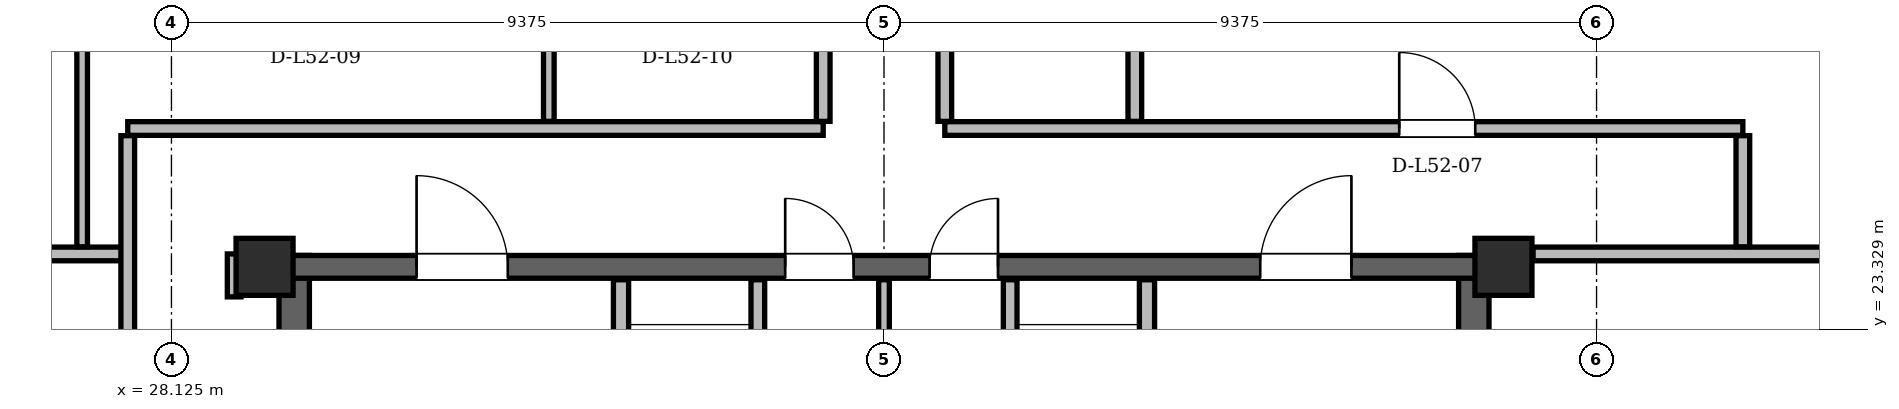
"""IFC4 building model, lengths in metres.
Left out: names, types, materials, properties, quantities, classifications, styles, units other than length and angle.
Written with IfcOpenShell. Run it as: python <this file> out.ifc"""

import sys

from ifc_helpers import new_model, si_unit, direction, frame, frame_2d, origin, origin_2d, place, context, subcontext, project, spatial, rectangle, hollow_rectangle, extrude, element, fill, save


model = new_model("IFC4")
c1 = context("Model", 3, precision=1e-05, world=origin(), true_north=direction((0.0, 1.0)))
c2 = subcontext(c1, "Body", "Model", "MODEL_VIEW")
j1 = project(units=[si_unit("LENGTHUNIT", "METRE"), si_unit("PLANEANGLEUNIT", "RADIAN")], contexts=[c1])
p1 = place(None, origin())
s1 = spatial("IfcSite", under=j1, at=p1, CompositionType="ELEMENT")
p2 = place(p1, origin())
s2 = spatial("IfcBuilding", under=s1, at=p2, CompositionType="ELEMENT")
p3 = place(p2, frame((0.0, 0.0, 197.4)))
s3 = spatial("IfcBuildingStorey", under=s2, at=p3, CompositionType="ELEMENT", Elevation=197.4)
for number, where, z_axis, x_axis in (
    (1, (45.65, 24.15, 0.0), (0.0, 0.0, 1.0), (1.0, 0.0, 0.0)),
    (2, (29.35, 24.15, 0.0), (0.0, 0.0, 1.0), (1.0, 0.0, 0.0)),
):
    element("IfcColumn", number, at=place(p3, frame(where, z_axis=z_axis, x_axis=x_axis)), inside=s3, PredefinedType="COLUMN", context=c2, shape_type="SweptSolid", body=[
        extrude(hollow_rectangle(XDim=0.75, YDim=0.75, WallThickness=0.06, at=origin_2d()), origin(), (0.0, 0.0, 1.0), 3.6),
    ])
for number, where, z_axis, x_axis in (
    (3, (29.74, 11.0, 0.0), (0.0, 0.0, 1.0), (0.0, 1.0, 0.0)),
    (4, (45.26, 11.0, 0.0), (0.0, 0.0, 1.0), (0.0, 1.0, 0.0)),
):
    element("IfcWall", number, at=place(p3, frame(where, z_axis=z_axis, x_axis=x_axis)), inside=s3, PredefinedType="SHEAR", context=c2, shape_type="SweptSolid", body=[
        extrude(rectangle(XDim=13.3, YDim=0.4, at=frame_2d((6.65, 0.0))), origin(), (0.0, 0.0, 1.0), 3.38),
    ])
p4 = place(p3, frame((29.65, 24.15, 0.0), z_axis=(0.0, 0.0, 1.0), x_axis=(1.0, 0.0, 0.0)))
e5 = element("IfcWall", 5, at=p4, inside=s3, PredefinedType="SHEAR", context=c2, shape_type="SweptSolid", body=[
    extrude(rectangle(XDim=15.7, YDim=0.3, at=frame_2d((7.85, 0.0))), origin(), (0.0, 0.0, 1.0), 3.38),
])
p5 = place(p4, frame((1.7, 0.0, 0.0)))
e6 = element("IfcOpeningElement", 6, at=p5, cuts=e5, PredefinedType="OPENING", context=c2, shape_type="SweptSolid", body=[
    extrude(rectangle(XDim=1.2, YDim=2.2, at=frame_2d((0.6, 1.1))), frame((0.0, 0.15, 0.0), z_axis=(0.0, -1.0, 0.0), x_axis=(1.0, 0.0, 0.0)), (0.0, 0.0, 1.0), 0.3),
])
p6 = place(p4, frame((12.8, 0.0, 0.0)))
e7 = element("IfcOpeningElement", 7, at=p6, cuts=e5, PredefinedType="OPENING", context=c2, shape_type="SweptSolid", body=[
    extrude(rectangle(XDim=1.2, YDim=2.2, at=frame_2d((0.6, 1.1))), frame((0.0, 0.15, 0.0), z_axis=(0.0, -1.0, 0.0), x_axis=(1.0, 0.0, 0.0)), (0.0, 0.0, 1.0), 0.3),
])
p7 = place(p4, frame((6.55, 0.0, 0.0)))
e8 = element("IfcOpeningElement", 8, at=p7, cuts=e5, PredefinedType="OPENING", context=c2, shape_type="SweptSolid", body=[
    extrude(rectangle(XDim=0.9, YDim=2.05, at=frame_2d((0.45, 1.025))), frame((0.0, 0.15, 0.0), z_axis=(0.0, -1.0, 0.0), x_axis=(1.0, 0.0, 0.0)), (0.0, 0.0, 1.0), 0.3),
])
p8 = place(p4, frame((8.45, 0.0, 0.0)))
e9 = element("IfcOpeningElement", 9, at=p8, cuts=e5, PredefinedType="OPENING", context=c2, shape_type="SweptSolid", body=[
    extrude(rectangle(XDim=0.9, YDim=2.05, at=frame_2d((0.45, 1.025))), frame((0.0, 0.15, 0.0), z_axis=(0.0, -1.0, 0.0), x_axis=(1.0, 0.0, 0.0)), (0.0, 0.0, 1.0), 0.3),
])
p9 = place(p3, frame((33.766, 43.21, 0.0), z_axis=(0.0, 0.0, 1.0), x_axis=(-0.499998847915, -0.86602606894, 0.0)))
e10 = element("IfcWall", 10, at=p9, inside=s3, PredefinedType="SOLIDWALL", context=c2, shape_type="SweptSolid", body=[
    extrude(rectangle(XDim=36.293, YDim=0.29, at=frame_2d((18.147, 0.0))), origin(), (0.0, 0.0, 1.0), 2.677),
])
p10 = place(p9, frame((8.034, 0.0, 0.0)))
e11 = element("IfcOpeningElement", 11, at=p10, cuts=e10, PredefinedType="OPENING", context=c2, shape_type="SweptSolid", body=[
    extrude(rectangle(XDim=1.5, YDim=2.2, at=frame_2d((0.75, 1.1))), frame((0.0, 0.145, 0.0), z_axis=(0.0, -1.0, 0.0), x_axis=(1.0, 0.0, 0.0)), (0.0, 0.0, 1.0), 0.29),
])
p11 = place(p9, frame((28.214, 0.0, 0.0)))
e12 = element("IfcOpeningElement", 12, at=p11, cuts=e10, PredefinedType="OPENING", context=c2, shape_type="SweptSolid", body=[
    extrude(rectangle(XDim=1.5, YDim=2.2, at=frame_2d((0.75, 1.1))), frame((0.0, 0.145, 0.0), z_axis=(0.0, -1.0, 0.0), x_axis=(1.0, 0.0, 0.0)), (0.0, 0.0, 1.0), 0.29),
])
p12 = place(p9, frame((32.772, 0.0, 0.85)))
e13 = element("IfcOpeningElement", 13, at=p12, cuts=e10, PredefinedType="OPENING", context=c2, shape_type="SweptSolid", body=[
    extrude(rectangle(XDim=2.4, YDim=1.717, at=frame_2d((1.2, 0.858))), frame((0.0, 0.145, 0.0), z_axis=(0.0, -1.0, 0.0), x_axis=(1.0, 0.0, 0.0)), (0.0, 0.0, 1.0), 0.29),
])
p13 = place(p9, frame((21.96, 0.0, 0.85)))
e14 = element("IfcOpeningElement", 14, at=p13, cuts=e10, PredefinedType="OPENING", context=c2, shape_type="SweptSolid", body=[
    extrude(rectangle(XDim=2.0, YDim=1.717, at=frame_2d((1.0, 0.858))), frame((0.0, 0.145, 0.0), z_axis=(0.0, -1.0, 0.0), x_axis=(1.0, 0.0, 0.0)), (0.0, 0.0, 1.0), 0.29),
])
p14 = place(p9, frame((2.382, 0.0, 0.85)))
e15 = element("IfcOpeningElement", 15, at=p14, cuts=e10, PredefinedType="OPENING", context=c2, shape_type="SweptSolid", body=[
    extrude(rectangle(XDim=1.6, YDim=1.7, at=frame_2d((0.8, 0.85))), frame((0.0, 0.145, 0.0), z_axis=(0.0, -1.0, 0.0), x_axis=(1.0, 0.0, 0.0)), (0.0, 0.0, 1.0), 0.29),
])
p15 = place(p9, frame((13.34, 0.0, 0.85)))
e16 = element("IfcOpeningElement", 16, at=p15, cuts=e10, PredefinedType="OPENING", context=c2, shape_type="SweptSolid", body=[
    extrude(rectangle(XDim=3.0, YDim=1.717, at=frame_2d((1.5, 0.858))), frame((0.0, 0.145, 0.0), z_axis=(0.0, -1.0, 0.0), x_axis=(1.0, 0.0, 0.0)), (0.0, 0.0, 1.0), 0.29),
])
p16 = place(p3, frame((34.04, 19.48, 0.0), z_axis=(0.0, 0.0, 1.0), x_axis=(0.0, 1.0, 0.0)))
e17 = element("IfcWall", 17, at=p16, inside=s3, PredefinedType="PARTITIONING", context=c2, shape_type="SweptSolid", body=[
    extrude(rectangle(XDim=4.5, YDim=0.2, at=frame_2d((2.25, 0.0))), origin(), (0.0, 0.0, 1.0), 3.38),
])
p17 = place(p16, frame((2.12, 0.0, 0.0)))
e18 = element("IfcOpeningElement", 18, at=p17, cuts=e17, PredefinedType="OPENING", context=c2, shape_type="SweptSolid", body=[
    extrude(rectangle(XDim=1.1, YDim=2.2, at=frame_2d((0.55, 1.1))), frame((0.0, 0.1, 0.0), z_axis=(0.0, -1.0, 0.0), x_axis=(1.0, 0.0, 0.0)), (0.0, 0.0, 1.0), 0.2),
])
p18 = place(p3, frame((35.84, 20.96, 0.0), z_axis=(0.0, 0.0, 1.0), x_axis=(0.0, 1.0, 0.0)))
e19 = element("IfcWall", 19, at=p18, inside=s3, PredefinedType="PARTITIONING", context=c2, shape_type="SweptSolid", body=[
    extrude(rectangle(XDim=3.02, YDim=0.18, at=frame_2d((1.51, 0.0))), origin(), (0.0, 0.0, 1.0), 3.38),
])
p19 = place(p3, frame((40.96, 19.48, 0.0), z_axis=(0.0, 0.0, 1.0), x_axis=(0.0, 1.0, 0.0)))
e20 = element("IfcWall", 20, at=p19, inside=s3, PredefinedType="PARTITIONING", context=c2, shape_type="SweptSolid", body=[
    extrude(rectangle(XDim=4.5, YDim=0.2, at=frame_2d((2.25, 0.0))), origin(), (0.0, 0.0, 1.0), 3.38),
])
p20 = place(p19, frame((2.12, 0.0, 0.0)))
e21 = element("IfcOpeningElement", 21, at=p20, cuts=e20, PredefinedType="OPENING", context=c2, shape_type="SweptSolid", body=[
    extrude(rectangle(XDim=1.1, YDim=2.2, at=frame_2d((0.55, 1.1))), frame((0.0, 0.1, 0.0), z_axis=(0.0, -1.0, 0.0), x_axis=(1.0, 0.0, 0.0)), (0.0, 0.0, 1.0), 0.2),
])
p21 = place(p3, frame((39.16, 20.96, 0.0), z_axis=(0.0, 0.0, 1.0), x_axis=(0.0, 1.0, 0.0)))
e22 = element("IfcWall", 22, at=p21, inside=s3, PredefinedType="PARTITIONING", context=c2, shape_type="SweptSolid", body=[
    extrude(rectangle(XDim=3.02, YDim=0.18, at=frame_2d((1.51, 0.0))), origin(), (0.0, 0.0, 1.0), 3.38),
])
p22 = place(p3, frame((37.5, 21.06, 0.0), z_axis=(0.0, 0.0, 1.0), x_axis=(0.0, 1.0, 0.0)))
e23 = element("IfcWall", 23, at=p22, inside=s3, PredefinedType="PARTITIONING", context=c2, shape_type="SweptSolid", body=[
    extrude(rectangle(XDim=2.92, YDim=0.14, at=frame_2d((1.46, 0.0))), origin(), (0.0, 0.0, 1.0), 3.38),
])
p23 = place(p3, frame((23.032, 24.32, 0.0), z_axis=(0.0, 0.0, 1.0), x_axis=(1.0, 0.0, 0.0)))
e24 = element("IfcWall", 24, at=p23, inside=s3, PredefinedType="PARTITIONING", context=c2, shape_type="SweptSolid", body=[
    extrude(rectangle(XDim=4.578, YDim=0.18, at=frame_2d((2.289, 0.0))), origin(), (0.0, 0.0, 1.0), 3.38),
])
p24 = place(p3, frame((46.04, 24.32, 0.0), z_axis=(0.0, 0.0, 1.0), x_axis=(1.0, 0.0, 0.0)))
e25 = element("IfcWall", 25, at=p24, inside=s3, PredefinedType="PARTITIONING", context=c2, shape_type="SweptSolid", body=[
    extrude(rectangle(XDim=5.928, YDim=0.18, at=frame_2d((2.964, 0.0))), origin(), (0.0, 0.0, 1.0), 3.38),
])
p25 = place(p3, frame((27.55, 25.97, 0.0), z_axis=(0.0, 0.0, 1.0), x_axis=(1.0, 0.0, 0.0)))
e26 = element("IfcWall", 26, at=p25, inside=s3, PredefinedType="PARTITIONING", context=c2, shape_type="SweptSolid", body=[
    extrude(rectangle(XDim=9.15, YDim=0.18, at=frame_2d((4.575, 0.0))), origin(), (0.0, 0.0, 1.0), 2.913),
])
p26 = place(p3, frame((38.3, 25.97, 0.0), z_axis=(0.0, 0.0, 1.0), x_axis=(1.0, 0.0, 0.0)))
e27 = element("IfcWall", 27, at=p26, inside=s3, PredefinedType="PARTITIONING", context=c2, shape_type="SweptSolid", body=[
    extrude(rectangle(XDim=10.5, YDim=0.18, at=frame_2d((5.25, 0.0))), origin(), (0.0, 0.0, 1.0), 2.913),
])
p27 = place(p26, frame((5.979, 0.0, 0.0)))
e28 = element("IfcOpeningElement", 28, at=p27, cuts=e27, PredefinedType="OPENING", context=c2, shape_type="SweptSolid", body=[
    extrude(rectangle(XDim=1.0, YDim=2.18, at=frame_2d((0.5, 1.09))), frame((0.0, 0.09, 0.0), z_axis=(0.0, -1.0, 0.0), x_axis=(1.0, 0.0, 0.0)), (0.0, 0.0, 1.0), 0.18),
])
p28 = place(p3, frame((26.95, 24.414, 0.0), z_axis=(0.0, 0.0, 1.0), x_axis=(0.0, 1.0, 0.0)))
e29 = element("IfcWall", 29, at=p28, inside=s3, PredefinedType="PARTITIONING", context=c2, shape_type="SweptSolid", body=[
    extrude(rectangle(XDim=2.912, YDim=0.14, at=frame_2d((1.456, 0.0))), origin(), (0.0, 0.0, 1.0), 3.38),
])
p29 = place(p3, frame((27.55, 18.544, 0.0), z_axis=(0.0, 0.0, 1.0), x_axis=(0.0, 1.0, 0.0)))
e30 = element("IfcWall", 30, at=p29, inside=s3, PredefinedType="PARTITIONING", context=c2, shape_type="SweptSolid", body=[
    extrude(rectangle(XDim=7.332, YDim=0.18, at=frame_2d((3.666, 0.0))), origin(), (0.0, 0.0, 1.0), 3.38),
])
p30 = place(p3, frame((28.95, 23.755, 0.0), z_axis=(0.0, 0.0, 1.0), x_axis=(0.0, 1.0, 0.0)))
e31 = element("IfcWall", 31, at=p30, inside=s3, PredefinedType="PARTITIONING", context=c2, shape_type="SweptSolid", body=[
    extrude(rectangle(XDim=0.565, YDim=0.18, at=frame_2d((0.283, 0.0))), origin(), (0.0, 0.0, 1.0), 3.38),
])
p31 = place(p3, frame((33.09, 26.064, 0.0), z_axis=(0.0, 0.0, 1.0), x_axis=(0.0, 1.0, 0.0)))
e32 = element("IfcWall", 32, at=p31, inside=s3, PredefinedType="PARTITIONING", context=c2, shape_type="SweptSolid", body=[
    extrude(rectangle(XDim=1.262, YDim=0.14, at=frame_2d((0.631, 0.0))), origin(), (0.0, 0.0, 1.0), 3.38),
])
p32 = place(p3, frame((36.7, 26.064, 0.0), z_axis=(0.0, 0.0, 1.0), x_axis=(0.0, 1.0, 0.0)))
e33 = element("IfcWall", 33, at=p32, inside=s3, PredefinedType="PARTITIONING", context=c2, shape_type="SweptSolid", body=[
    extrude(rectangle(XDim=16.997, YDim=0.18, at=frame_2d((8.499, 0.0))), origin(), (0.0, 0.0, 1.0), 3.38),
])
p33 = place(p32, frame((3.21, 0.0, 0.0)))
e34 = element("IfcOpeningElement", 34, at=p33, cuts=e33, PredefinedType="OPENING", context=c2, shape_type="SweptSolid", body=[
    extrude(rectangle(XDim=1.0, YDim=2.18, at=frame_2d((0.5, 1.09))), frame((0.0, 0.09, 0.0), z_axis=(0.0, -1.0, 0.0), x_axis=(1.0, 0.0, 0.0)), (0.0, 0.0, 1.0), 0.18),
])
p34 = place(p3, frame((38.3, 26.064, 0.0), z_axis=(0.0, 0.0, 1.0), x_axis=(0.0, 1.0, 0.0)))
e35 = element("IfcWall", 35, at=p34, inside=s3, PredefinedType="PARTITIONING", context=c2, shape_type="SweptSolid", body=[
    extrude(rectangle(XDim=6.042, YDim=0.18, at=frame_2d((3.021, 0.0))), origin(), (0.0, 0.0, 1.0), 3.38),
])
p35 = place(p34, frame((4.892, 0.0, 0.0)))
e36 = element("IfcOpeningElement", 36, at=p35, cuts=e35, PredefinedType="OPENING", context=c2, shape_type="SweptSolid", body=[
    extrude(rectangle(XDim=1.0, YDim=2.18, at=frame_2d((0.5, 1.09))), frame((0.0, 0.09, 0.0), z_axis=(0.0, -1.0, 0.0), x_axis=(1.0, 0.0, 0.0)), (0.0, 0.0, 1.0), 0.18),
])
p36 = place(p3, frame((40.8, 26.064, 0.0), z_axis=(0.0, 0.0, 1.0), x_axis=(0.0, 1.0, 0.0)))
e37 = element("IfcWall", 37, at=p36, inside=s3, PredefinedType="PARTITIONING", context=c2, shape_type="SweptSolid", body=[
    extrude(rectangle(XDim=16.997, YDim=0.18, at=frame_2d((8.499, 0.0))), origin(), (0.0, 0.0, 1.0), 3.38),
])
p37 = place(p3, frame((48.8, 24.414, 0.0), z_axis=(0.0, 0.0, 1.0), x_axis=(0.0, 1.0, 0.0)))
e38 = element("IfcWall", 38, at=p37, inside=s3, PredefinedType="PARTITIONING", context=c2, shape_type="SweptSolid", body=[
    extrude(rectangle(XDim=1.462, YDim=0.18, at=frame_2d((0.731, 0.0))), origin(), (0.0, 0.0, 1.0), 3.38),
])
p38 = place(p5, origin())
e39 = element("IfcDoor", 39, at=p38, inside=s3, OperationType="SINGLE_SWING_LEFT", PredefinedType="DOOR", context=c2, shape_type="SweptSolid", body=[
    extrude(rectangle(XDim=1.2, YDim=2.2, at=frame_2d((0.6, 1.1))), frame((0.0, 0.025, 0.0), z_axis=(0.0, -1.0, 0.0), x_axis=(1.0, 0.0, 0.0)), (0.0, 0.0, 1.0), 0.05),
])
fill(e6, e39)
p39 = place(p6, origin())
e40 = element("IfcDoor", 40, at=p39, inside=s3, OperationType="SINGLE_SWING_RIGHT", PredefinedType="DOOR", context=c2, shape_type="SweptSolid", body=[
    extrude(rectangle(XDim=1.2, YDim=2.2, at=frame_2d((0.6, 1.1))), frame((0.0, 0.025, 0.0), z_axis=(0.0, -1.0, 0.0), x_axis=(1.0, 0.0, 0.0)), (0.0, 0.0, 1.0), 0.05),
])
fill(e7, e40)
p40 = place(p7, origin())
e41 = element("IfcDoor", 41, at=p40, inside=s3, OperationType="SINGLE_SWING_LEFT", PredefinedType="DOOR", context=c2, shape_type="SweptSolid", body=[
    extrude(rectangle(XDim=0.9, YDim=2.05, at=frame_2d((0.45, 1.025))), frame((0.0, 0.025, 0.0), z_axis=(0.0, -1.0, 0.0), x_axis=(1.0, 0.0, 0.0)), (0.0, 0.0, 1.0), 0.05),
])
fill(e8, e41)
p41 = place(p8, origin())
e42 = element("IfcDoor", 42, at=p41, inside=s3, OperationType="SINGLE_SWING_RIGHT", PredefinedType="DOOR", context=c2, shape_type="SweptSolid", body=[
    extrude(rectangle(XDim=0.9, YDim=2.05, at=frame_2d((0.45, 1.025))), frame((0.0, 0.025, 0.0), z_axis=(0.0, -1.0, 0.0), x_axis=(1.0, 0.0, 0.0)), (0.0, 0.0, 1.0), 0.05),
])
fill(e9, e42)
p42 = place(p27, origin())
e43 = element("IfcDoor", 43, at=p42, inside=s3, OperationType="SINGLE_SWING_LEFT", PredefinedType="DOOR", context=c2, shape_type="SweptSolid", body=[
    extrude(rectangle(XDim=1.0, YDim=2.18, at=frame_2d((0.5, 1.09))), frame((0.0, 0.025, 0.0), z_axis=(0.0, -1.0, 0.0), x_axis=(1.0, 0.0, 0.0)), (0.0, 0.0, 1.0), 0.05),
])
fill(e28, e43)
save(model, sys.argv[1])
